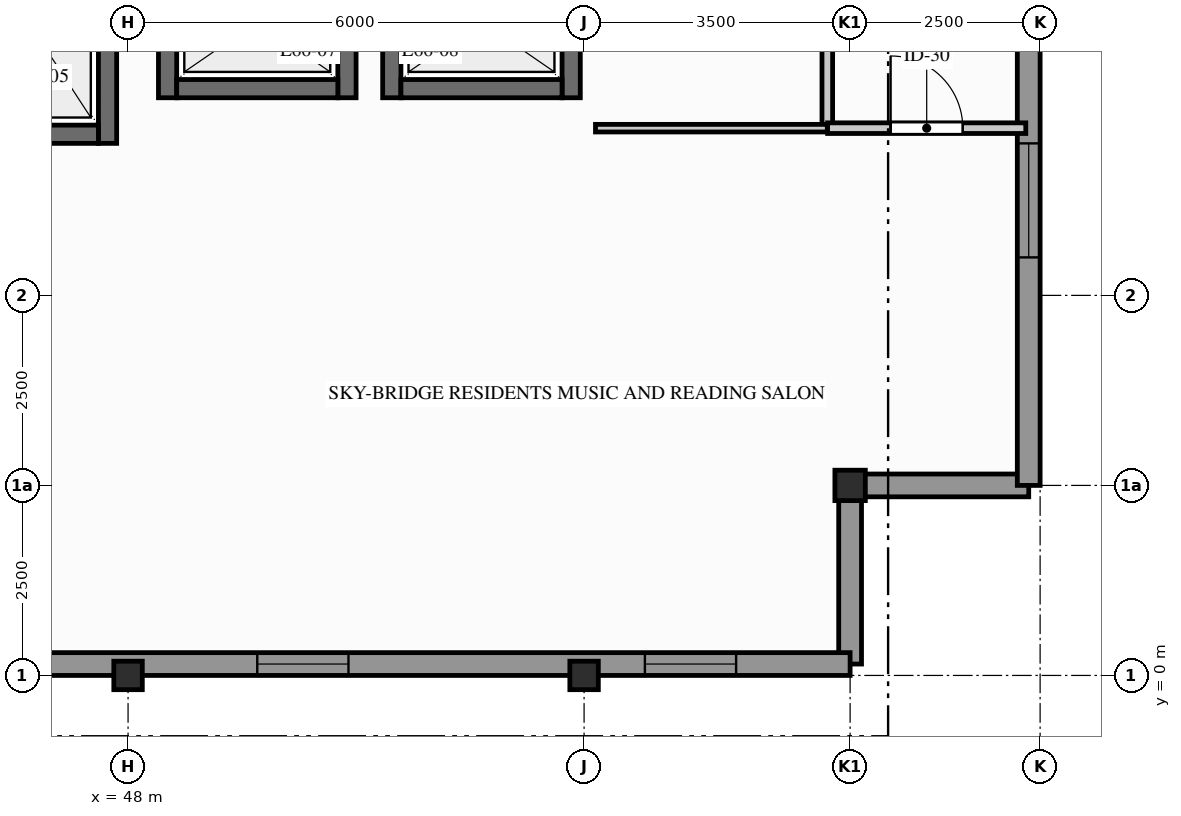
"""IFC4 building model, lengths in metres.
Left out: names, types, materials, properties, quantities, classifications, styles, units other than length and angle.
Written with IfcOpenShell. Run it as: python <this file> out.ifc"""

import sys

from ifc_helpers import new_model, si_unit, direction, frame, frame_2d, origin, origin_2d, place, context, subcontext, project, spatial, rectangle, hollow_rectangle, i_section, extrude, element, fill, save


model = new_model("IFC4")
c1 = context("Model", 3, precision=1e-05, world=origin(), true_north=direction((0.0, 1.0)))
c2 = subcontext(c1, "Body", "Model", "MODEL_VIEW")
j1 = project(units=[si_unit("LENGTHUNIT", "METRE"), si_unit("PLANEANGLEUNIT", "RADIAN")], contexts=[c1])
p1 = place(None, origin())
s1 = spatial("IfcSite", under=j1, at=p1, CompositionType="ELEMENT")
p2 = place(p1, origin())
s2 = spatial("IfcBuilding", under=s1, at=p2, CompositionType="ELEMENT")
p3 = place(p2, frame((0.0, 0.0, 218.0)))
s3 = spatial("IfcBuildingStorey", under=s2, at=p3, CompositionType="ELEMENT", Elevation=218.0)
for number, where, z_axis, x_axis in (
    (1, (48.0, 0.0, 0.0), (0.0, 0.0, 1.0), (1.0, 0.0, 0.0)),
    (2, (54.0, 0.0, 0.0), (0.0, 0.0, 1.0), (1.0, 0.0, 0.0)),
):
    element("IfcColumn", number, at=place(p3, frame(where, z_axis=z_axis, x_axis=x_axis)), inside=s3, PredefinedType="COLUMN", context=c2, shape_type="SweptSolid", body=[
        extrude(i_section(OverallWidth=0.375, OverallDepth=0.375, WebThickness=0.017, FlangeThickness=0.027, FilletRadius=0.015, at=origin_2d()), origin(), (0.0, 0.0, 1.0), 3.1),
    ])
p4 = place(p3, frame((57.5, 2.5, 0.0), z_axis=(0.0, 0.0, 1.0), x_axis=(1.0, 0.0, 0.0)))
e3 = element("IfcColumn", 3, at=p4, inside=s3, PredefinedType="COLUMN", context=c2, shape_type="SweptSolid", body=[
    extrude(hollow_rectangle(XDim=0.4, YDim=0.4, WallThickness=0.02, InnerFilletRadius=0.012, OuterFilletRadius=0.024, at=origin_2d()), origin(), (0.0, 0.0, 1.0), 3.1),
])
for number, where, z_axis, x_axis in (
    (4, (57.5, 0.15, 0.0), (0.0, 0.0, 1.0), (0.0, 1.0, 0.0)),
    (5, (57.5, 2.5, 0.0), (0.0, 0.0, 1.0), (1.0, 0.0, 0.0)),
):
    element("IfcWall", number, at=place(p3, frame(where, z_axis=z_axis, x_axis=x_axis)), inside=s3, PredefinedType="STANDARD", context=c2, shape_type="SweptSolid", body=[
        extrude(rectangle(XDim=2.35, YDim=0.3, at=frame_2d((1.175, 0.0))), origin(), (0.0, 0.0, 1.0), 2.89),
    ])
p5 = place(p3, frame((2.5, 0.15, 0.0), z_axis=(0.0, 0.0, 1.0), x_axis=(1.0, 0.0, 0.0)))
e6 = element("IfcWall", 6, at=p5, inside=s3, PredefinedType="STANDARD", context=c2, shape_type="SweptSolid", body=[
    extrude(rectangle(XDim=55.0, YDim=0.3, at=frame_2d((27.5, 0.0))), origin(), (0.0, 0.0, 1.0), 2.332),
])
p6 = place(p5, frame((1.0, 0.0, 0.312)))
e7 = element("IfcOpeningElement", 7, at=p6, cuts=e6, PredefinedType="OPENING", context=c2, shape_type="SweptSolid", body=[
    extrude(rectangle(XDim=1.5, YDim=1.8, at=frame_2d((0.75, 0.9))), frame((0.0, 0.16, 0.0), z_axis=(0.0, -1.0, 0.0), x_axis=(1.0, 0.0, 0.0)), (0.0, 0.0, 1.0), 0.32),
])
p7 = place(p5, frame((24.5, 0.0, 1.15)))
e8 = element("IfcOpeningElement", 8, at=p7, cuts=e6, PredefinedType="OPENING", context=c2, shape_type="SweptSolid", body=[
    extrude(rectangle(XDim=0.9, YDim=0.9, at=frame_2d((0.45, 0.45))), frame((0.0, 0.16, 0.0), z_axis=(0.0, -1.0, 0.0), x_axis=(1.0, 0.0, 0.0)), (0.0, 0.0, 1.0), 0.32),
])
p8 = place(p5, frame((47.2, 0.0, 0.512)))
e9 = element("IfcOpeningElement", 9, at=p8, cuts=e6, PredefinedType="OPENING", context=c2, shape_type="SweptSolid", body=[
    extrude(rectangle(XDim=1.2, YDim=1.6, at=frame_2d((0.6, 0.8))), frame((0.0, 0.16, 0.0), z_axis=(0.0, -1.0, 0.0), x_axis=(1.0, 0.0, 0.0)), (0.0, 0.0, 1.0), 0.32),
])
p9 = place(p5, frame((52.3, 0.0, 0.512)))
e10 = element("IfcOpeningElement", 10, at=p9, cuts=e6, PredefinedType="OPENING", context=c2, shape_type="SweptSolid", body=[
    extrude(rectangle(XDim=1.2, YDim=1.6, at=frame_2d((0.6, 0.8))), frame((0.0, 0.16, 0.0), z_axis=(0.0, -1.0, 0.0), x_axis=(1.0, 0.0, 0.0)), (0.0, 0.0, 1.0), 0.32),
])
p10 = place(p3, frame((59.85, 2.5, 0.0), z_axis=(0.0, 0.0, 1.0), x_axis=(0.0, 1.0, 0.0)))
e11 = element("IfcWall", 11, at=p10, inside=s3, PredefinedType="STANDARD", context=c2, shape_type="SweptSolid", body=[
    extrude(rectangle(XDim=8.05, YDim=0.3, at=frame_2d((4.025, 0.0))), origin(), (0.0, 0.0, 1.0), 2.89),
])
p11 = place(p10, frame((3.0, 0.0, 0.87)))
e12 = element("IfcOpeningElement", 12, at=p11, cuts=e11, PredefinedType="OPENING", context=c2, shape_type="SweptSolid", body=[
    extrude(rectangle(XDim=1.5, YDim=1.8, at=frame_2d((0.75, 0.9))), frame((0.0, 0.16, 0.0), z_axis=(0.0, -1.0, 0.0), x_axis=(1.0, 0.0, 0.0)), (0.0, 0.0, 1.0), 0.32),
])
p12 = place(p3, frame((47.73, 7.0, 0.0), z_axis=(0.0, 0.0, 1.0), x_axis=(0.0, 1.0, 0.0)))
e13 = element("IfcWall", 13, at=p12, inside=s3, PredefinedType="SHEAR", context=c2, shape_type="SweptSolid", body=[
    extrude(rectangle(XDim=2.7, YDim=0.24, at=frame_2d((1.35, 0.0))), origin(), (0.0, 0.0, 1.0), 2.89),
])
p13 = place(p3, frame((46.09, 7.12, 0.0), z_axis=(0.0, 0.0, 1.0), x_axis=(1.0, 0.0, 0.0)))
e14 = element("IfcWall", 14, at=p13, inside=s3, PredefinedType="SHEAR", context=c2, shape_type="SweptSolid", body=[
    extrude(rectangle(XDim=1.52, YDim=0.24, at=frame_2d((0.76, 0.0))), origin(), (0.0, 0.0, 1.0), 2.89),
])
for number, where, z_axis, x_axis in (
    (15, (48.52, 7.6, 0.0), (0.0, 0.0, 1.0), (0.0, 1.0, 0.0)),
    (16, (50.88, 7.6, 0.0), (0.0, 0.0, 1.0), (0.0, 1.0, 0.0)),
):
    element("IfcWall", number, at=place(p3, frame(where, z_axis=z_axis, x_axis=x_axis)), inside=s3, PredefinedType="SHEAR", context=c2, shape_type="SweptSolid", body=[
        extrude(rectangle(XDim=2.0, YDim=0.24, at=frame_2d((1.0, 0.0))), origin(), (0.0, 0.0, 1.0), 2.89),
    ])
p14 = place(p3, frame((48.64, 7.72, 0.0), z_axis=(0.0, 0.0, 1.0), x_axis=(1.0, 0.0, 0.0)))
e17 = element("IfcWall", 17, at=p14, inside=s3, PredefinedType="SHEAR", context=c2, shape_type="SweptSolid", body=[
    extrude(rectangle(XDim=2.12, YDim=0.24, at=frame_2d((1.06, 0.0))), origin(), (0.0, 0.0, 1.0), 2.89),
])
for number, where, z_axis, x_axis in (
    (18, (51.47, 7.6, 0.0), (0.0, 0.0, 1.0), (0.0, 1.0, 0.0)),
    (19, (53.83, 7.6, 0.0), (0.0, 0.0, 1.0), (0.0, 1.0, 0.0)),
):
    element("IfcWall", number, at=place(p3, frame(where, z_axis=z_axis, x_axis=x_axis)), inside=s3, PredefinedType="SHEAR", context=c2, shape_type="SweptSolid", body=[
        extrude(rectangle(XDim=2.0, YDim=0.24, at=frame_2d((1.0, 0.0))), origin(), (0.0, 0.0, 1.0), 2.89),
    ])
p15 = place(p3, frame((51.59, 7.72, 0.0), z_axis=(0.0, 0.0, 1.0), x_axis=(1.0, 0.0, 0.0)))
e20 = element("IfcWall", 20, at=p15, inside=s3, PredefinedType="SHEAR", context=c2, shape_type="SweptSolid", body=[
    extrude(rectangle(XDim=2.12, YDim=0.24, at=frame_2d((1.06, 0.0))), origin(), (0.0, 0.0, 1.0), 2.89),
])
p16 = place(p3, frame((57.2, 7.2, 0.0), z_axis=(0.0, 0.0, 1.0), x_axis=(0.0, 1.0, 0.0)))
e21 = element("IfcWall", 21, at=p16, inside=s3, PredefinedType="PARTITIONING", context=c2, shape_type="SweptSolid", body=[
    extrude(rectangle(XDim=5.4, YDim=0.14, at=frame_2d((2.7, 0.0))), origin(), (0.0, 0.0, 1.0), 2.325),
])
p17 = place(p3, frame((54.15, 7.2, 0.0), z_axis=(0.0, 0.0, 1.0), x_axis=(1.0, 0.0, 0.0)))
e22 = element("IfcWall", 22, at=p17, inside=s3, PredefinedType="PARTITIONING", context=c2, shape_type="SweptSolid", body=[
    extrude(rectangle(XDim=3.05, YDim=0.1, at=frame_2d((1.525, 0.0))), origin(), (0.0, 0.0, 1.0), 2.89),
])
p18 = place(p3, frame((57.204, 7.2, 0.0), z_axis=(0.0, 0.0, 1.0), x_axis=(1.0, 0.0, 0.0)))
e23 = element("IfcWall", 23, at=p18, inside=s3, PredefinedType="PARTITIONING", context=c2, shape_type="SweptSolid", body=[
    extrude(rectangle(XDim=2.607, YDim=0.14, at=frame_2d((1.304, 0.0))), origin(), (0.0, 0.0, 1.0), 2.89),
])
p19 = place(p18, frame((0.829, 0.0, 0.0)))
e24 = element("IfcOpeningElement", 24, at=p19, cuts=e23, PredefinedType="OPENING", context=c2, shape_type="SweptSolid", body=[
    extrude(rectangle(XDim=0.95, YDim=2.05, at=frame_2d((0.475, 1.025))), frame((0.0, 0.08, 0.0), z_axis=(0.0, -1.0, 0.0), x_axis=(1.0, 0.0, 0.0)), (0.0, 0.0, 1.0), 0.16),
])
p20 = place(p8, origin())
e25 = element("IfcWindow", 25, at=p20, inside=s3, PartitioningType="SINGLE_PANEL", PredefinedType="WINDOW", context=c2, shape_type="SweptSolid", body=[
    extrude(rectangle(XDim=1.2, YDim=1.6, at=frame_2d((0.6, 0.8))), frame((0.0, 0.03, 0.0), z_axis=(0.0, -1.0, 0.0), x_axis=(1.0, 0.0, 0.0)), (0.0, 0.0, 1.0), 0.06),
])
fill(e9, e25)
p21 = place(p9, origin())
e26 = element("IfcWindow", 26, at=p21, inside=s3, PartitioningType="SINGLE_PANEL", PredefinedType="WINDOW", context=c2, shape_type="SweptSolid", body=[
    extrude(rectangle(XDim=1.2, YDim=1.6, at=frame_2d((0.6, 0.8))), frame((0.0, 0.03, 0.0), z_axis=(0.0, -1.0, 0.0), x_axis=(1.0, 0.0, 0.0)), (0.0, 0.0, 1.0), 0.06),
])
fill(e10, e26)
p22 = place(p11, origin())
e27 = element("IfcWindow", 27, at=p22, inside=s3, PartitioningType="SINGLE_PANEL", PredefinedType="WINDOW", context=c2, shape_type="SweptSolid", body=[
    extrude(rectangle(XDim=1.5, YDim=1.8, at=frame_2d((0.75, 0.9))), frame((0.0, 0.03, 0.0), z_axis=(0.0, -1.0, 0.0), x_axis=(1.0, 0.0, 0.0)), (0.0, 0.0, 1.0), 0.06),
])
fill(e12, e27)
p23 = place(p19, origin())
e28 = element("IfcDoor", 28, at=p23, inside=s3, OperationType="SINGLE_SWING_LEFT", PredefinedType="DOOR", context=c2, shape_type="SweptSolid", body=[
    extrude(rectangle(XDim=0.95, YDim=2.05, at=frame_2d((0.475, 1.025))), frame((0.0, 0.025, 0.0), z_axis=(0.0, -1.0, 0.0), x_axis=(1.0, 0.0, 0.0)), (0.0, 0.0, 1.0), 0.05),
])
fill(e24, e28)
save(model, sys.argv[1])
